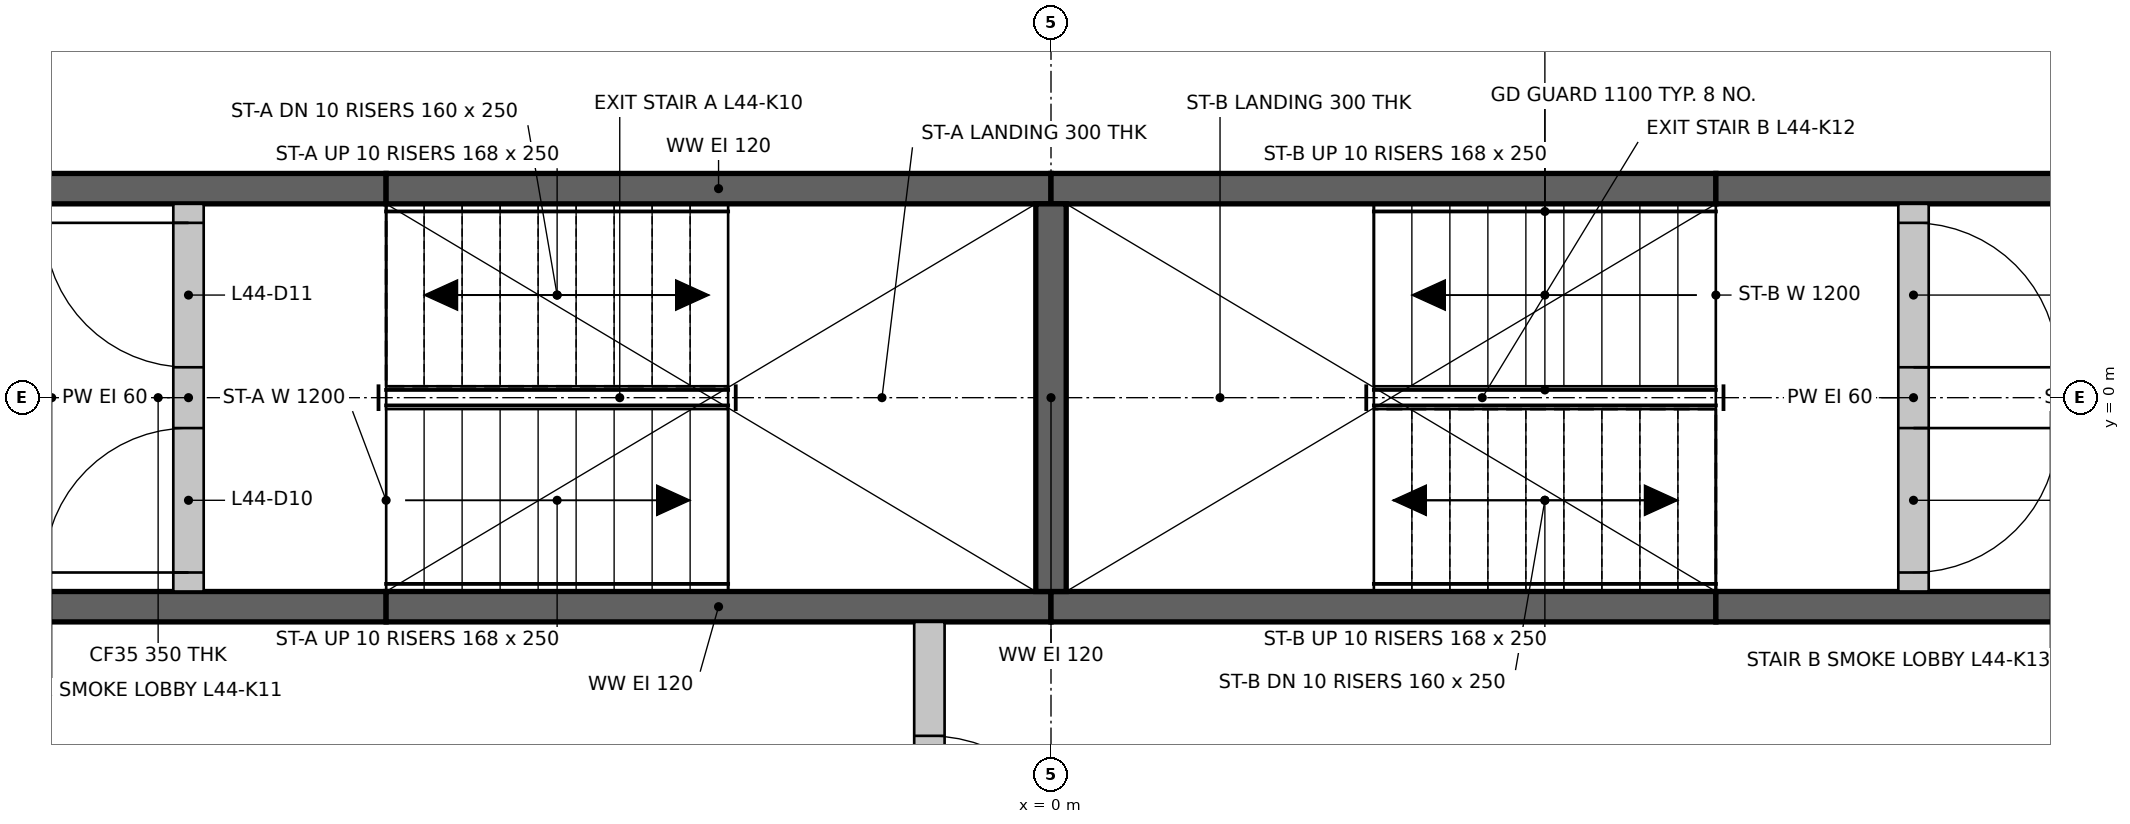
"""IFC4 building model, lengths in metres.
Left out: names, types, materials, properties, quantities, classifications, styles, units other than length and angle.
Written with IfcOpenShell. Run it as: python <this file> out.ifc"""

import sys

from ifc_helpers import new_model, si_unit, direction, frame, frame_2d, origin, place, context, subcontext, project, spatial, rectangle, extrude, element, fill, save


model = new_model("IFC4")
c1 = context("Model", 3, precision=1e-05, world=origin(), true_north=direction((0.0, 1.0)))
c2 = subcontext(c1, "Body", "Model", "MODEL_VIEW")
j1 = project(units=[si_unit("LENGTHUNIT", "METRE"), si_unit("PLANEANGLEUNIT", "RADIAN")], contexts=[c1])
p1 = place(None, origin())
s1 = spatial("IfcSite", under=j1, at=p1, CompositionType="ELEMENT")
p2 = place(p1, origin())
s2 = spatial("IfcBuilding", under=s1, at=p2, CompositionType="ELEMENT")
p3 = place(p2, frame((0.0, 0.0, 167.55)))
s3 = spatial("IfcBuildingStorey", under=s2, at=p3, CompositionType="ELEMENT", Elevation=167.55)
p4 = place(p3, frame((-7.374, -1.375, 0.0), z_axis=(0.0, 0.0, 1.0), x_axis=(1.0, 0.0, 0.0)))
e1 = element("IfcWall", 1, at=p4, inside=s3, PredefinedType="SHEAR", context=c2, shape_type="SweptSolid", body=[
    extrude(rectangle(XDim=3.0, YDim=0.2, at=frame_2d((1.5, 0.0))), origin(), (0.0, 0.0, 1.0), 3.0),
])
for number, where, z_axis, x_axis in (
    (2, (-4.374, -1.375, 0.0), (0.0, 0.0, 1.0), (1.0, 0.0, 0.0)),
    (3, (0.0, -1.375, 0.0), (0.0, 0.0, 1.0), (1.0, 0.0, 0.0)),
):
    element("IfcWall", number, at=place(p3, frame(where, z_axis=z_axis, x_axis=x_axis)), inside=s3, PredefinedType="SHEAR", context=c2, shape_type="SweptSolid", body=[
        extrude(rectangle(XDim=4.374, YDim=0.2, at=frame_2d((2.187, 0.0))), origin(), (0.0, 0.0, 1.0), 3.0),
    ])
for number, where, z_axis, x_axis in (
    (4, (4.374, -1.375, 0.0), (0.0, 0.0, 1.0), (1.0, 0.0, 0.0)),
    (5, (-7.374, 1.375, 0.0), (0.0, 0.0, 1.0), (1.0, 0.0, 0.0)),
):
    element("IfcWall", number, at=place(p3, frame(where, z_axis=z_axis, x_axis=x_axis)), inside=s3, PredefinedType="SHEAR", context=c2, shape_type="SweptSolid", body=[
        extrude(rectangle(XDim=3.0, YDim=0.2, at=frame_2d((1.5, 0.0))), origin(), (0.0, 0.0, 1.0), 3.0),
    ])
for number, where, z_axis, x_axis in (
    (6, (-4.374, 1.375, 0.0), (0.0, 0.0, 1.0), (1.0, 0.0, 0.0)),
    (7, (0.0, 1.375, 0.0), (0.0, 0.0, 1.0), (1.0, 0.0, 0.0)),
):
    element("IfcWall", number, at=place(p3, frame(where, z_axis=z_axis, x_axis=x_axis)), inside=s3, PredefinedType="SHEAR", context=c2, shape_type="SweptSolid", body=[
        extrude(rectangle(XDim=4.374, YDim=0.2, at=frame_2d((2.187, 0.0))), origin(), (0.0, 0.0, 1.0), 3.0),
    ])
p5 = place(p3, frame((4.374, 1.375, 0.0), z_axis=(0.0, 0.0, 1.0), x_axis=(1.0, 0.0, 0.0)))
e8 = element("IfcWall", 8, at=p5, inside=s3, PredefinedType="SHEAR", context=c2, shape_type="SweptSolid", body=[
    extrude(rectangle(XDim=3.0, YDim=0.2, at=frame_2d((1.5, 0.0))), origin(), (0.0, 0.0, 1.0), 3.0),
])
p6 = place(p3, frame((0.0, -1.275, 0.0), z_axis=(0.0, 0.0, 1.0), x_axis=(0.0, 1.0, 0.0)))
e9 = element("IfcWall", 9, at=p6, inside=s3, PredefinedType="SHEAR", context=c2, shape_type="SweptSolid", body=[
    extrude(rectangle(XDim=2.55, YDim=0.2, at=frame_2d((1.275, 0.0))), origin(), (0.0, 0.0, 1.0), 3.0),
])
p7 = place(p3, frame((-0.8, -3.974, 0.0), z_axis=(0.0, 0.0, 1.0), x_axis=(0.0, 1.0, 0.0)))
e10 = element("IfcWall", 10, at=p7, inside=s3, PredefinedType="PARTITIONING", context=c2, shape_type="SweptSolid", body=[
    extrude(rectangle(XDim=2.499, YDim=0.2, at=frame_2d((1.25, 0.0))), origin(), (0.0, 0.0, 1.0), 3.0),
])
p8 = place(p7, frame((0.75, 0.0, 0.0)))
e11 = element("IfcOpeningElement", 11, at=p8, cuts=e10, PredefinedType="OPENING", context=c2, shape_type="SweptSolid", body=[
    extrude(rectangle(XDim=1.0, YDim=2.1, at=frame_2d((0.5, 1.05))), frame((0.0, 0.11, 0.0), z_axis=(0.0, -1.0, 0.0), x_axis=(1.0, 0.0, 0.0)), (0.0, 0.0, 1.0), 0.22),
])
p9 = place(p3, frame((-5.674, -1.275, 0.0), z_axis=(0.0, 0.0, 1.0), x_axis=(0.0, 1.0, 0.0)))
e12 = element("IfcWall", 12, at=p9, inside=s3, PredefinedType="PARTITIONING", context=c2, shape_type="SweptSolid", body=[
    extrude(rectangle(XDim=2.55, YDim=0.2, at=frame_2d((1.275, 0.0))), origin(), (0.0, 0.0, 1.0), 3.0),
])
p10 = place(p9, frame((0.125, 0.0, 0.0)))
e13 = element("IfcOpeningElement", 13, at=p10, cuts=e12, PredefinedType="OPENING", context=c2, shape_type="SweptSolid", body=[
    extrude(rectangle(XDim=0.95, YDim=2.1, at=frame_2d((0.475, 1.05))), frame((0.0, 0.11, 0.0), z_axis=(0.0, -1.0, 0.0), x_axis=(1.0, 0.0, 0.0)), (0.0, 0.0, 1.0), 0.22),
])
p11 = place(p9, frame((1.475, 0.0, 0.0)))
e14 = element("IfcOpeningElement", 14, at=p11, cuts=e12, PredefinedType="OPENING", context=c2, shape_type="SweptSolid", body=[
    extrude(rectangle(XDim=0.95, YDim=2.1, at=frame_2d((0.475, 1.05))), frame((0.0, 0.11, 0.0), z_axis=(0.0, -1.0, 0.0), x_axis=(1.0, 0.0, 0.0)), (0.0, 0.0, 1.0), 0.22),
])
p12 = place(p3, frame((5.674, -1.275, 0.0), z_axis=(0.0, 0.0, 1.0), x_axis=(0.0, 1.0, 0.0)))
e15 = element("IfcWall", 15, at=p12, inside=s3, PredefinedType="PARTITIONING", context=c2, shape_type="SweptSolid", body=[
    extrude(rectangle(XDim=2.55, YDim=0.2, at=frame_2d((1.275, 0.0))), origin(), (0.0, 0.0, 1.0), 3.0),
])
p13 = place(p12, frame((0.125, 0.0, 0.0)))
e16 = element("IfcOpeningElement", 16, at=p13, cuts=e15, PredefinedType="OPENING", context=c2, shape_type="SweptSolid", body=[
    extrude(rectangle(XDim=0.95, YDim=2.1, at=frame_2d((0.475, 1.05))), frame((0.0, 0.11, 0.0), z_axis=(0.0, -1.0, 0.0), x_axis=(1.0, 0.0, 0.0)), (0.0, 0.0, 1.0), 0.22),
])
p14 = place(p12, frame((1.475, 0.0, 0.0)))
e17 = element("IfcOpeningElement", 17, at=p14, cuts=e15, PredefinedType="OPENING", context=c2, shape_type="SweptSolid", body=[
    extrude(rectangle(XDim=0.95, YDim=2.1, at=frame_2d((0.475, 1.05))), frame((0.0, 0.11, 0.0), z_axis=(0.0, -1.0, 0.0), x_axis=(1.0, 0.0, 0.0)), (0.0, 0.0, 1.0), 0.22),
])
p15 = place(p10, origin())
e18 = element("IfcDoor", 18, at=p15, inside=s3, OperationType="SINGLE_SWING_LEFT", PredefinedType="DOOR", context=c2, shape_type="SweptSolid", body=[
    extrude(rectangle(XDim=0.95, YDim=2.1, at=frame_2d((0.475, 1.05))), frame((0.0, 0.025, 0.0), z_axis=(0.0, -1.0, 0.0), x_axis=(1.0, 0.0, 0.0)), (0.0, 0.0, 1.0), 0.05),
])
fill(e13, e18)
p16 = place(p11, origin())
e19 = element("IfcDoor", 19, at=p16, inside=s3, OperationType="SINGLE_SWING_RIGHT", PredefinedType="DOOR", context=c2, shape_type="SweptSolid", body=[
    extrude(rectangle(XDim=0.95, YDim=2.1, at=frame_2d((0.475, 1.05))), frame((0.0, 0.025, 0.0), z_axis=(0.0, -1.0, 0.0), x_axis=(1.0, 0.0, 0.0)), (0.0, 0.0, 1.0), 0.05),
])
fill(e14, e19)
p17 = place(p13, frame((0.95, 0.0, 0.0), z_axis=(0.0, 0.0, 1.0), x_axis=(-1.0, 0.0, 0.0)))
e20 = element("IfcDoor", 20, at=p17, inside=s3, OperationType="SINGLE_SWING_RIGHT", PredefinedType="DOOR", context=c2, shape_type="SweptSolid", body=[
    extrude(rectangle(XDim=0.95, YDim=2.1, at=frame_2d((0.475, 1.05))), frame((0.0, 0.025, 0.0), z_axis=(0.0, -1.0, 0.0), x_axis=(1.0, 0.0, 0.0)), (0.0, 0.0, 1.0), 0.05),
])
fill(e16, e20)
p18 = place(p14, frame((0.95, 0.0, 0.0), z_axis=(0.0, 0.0, 1.0), x_axis=(-1.0, 0.0, 0.0)))
e21 = element("IfcDoor", 21, at=p18, inside=s3, OperationType="SINGLE_SWING_LEFT", PredefinedType="DOOR", context=c2, shape_type="SweptSolid", body=[
    extrude(rectangle(XDim=0.95, YDim=2.1, at=frame_2d((0.475, 1.05))), frame((0.0, 0.025, 0.0), z_axis=(0.0, -1.0, 0.0), x_axis=(1.0, 0.0, 0.0)), (0.0, 0.0, 1.0), 0.05),
])
fill(e17, e21)
p19 = place(p8, frame((1.0, 0.0, 0.0), z_axis=(0.0, 0.0, 1.0), x_axis=(-1.0, 0.0, 0.0)))
e22 = element("IfcDoor", 22, at=p19, inside=s3, OperationType="SINGLE_SWING_LEFT", PredefinedType="DOOR", context=c2, shape_type="SweptSolid", body=[
    extrude(rectangle(XDim=1.0, YDim=2.1, at=frame_2d((0.5, 1.05))), frame((0.0, 0.025, 0.0), z_axis=(0.0, -1.0, 0.0), x_axis=(1.0, 0.0, 0.0)), (0.0, 0.0, 1.0), 0.05),
])
fill(e11, e22)
save(model, sys.argv[1])
